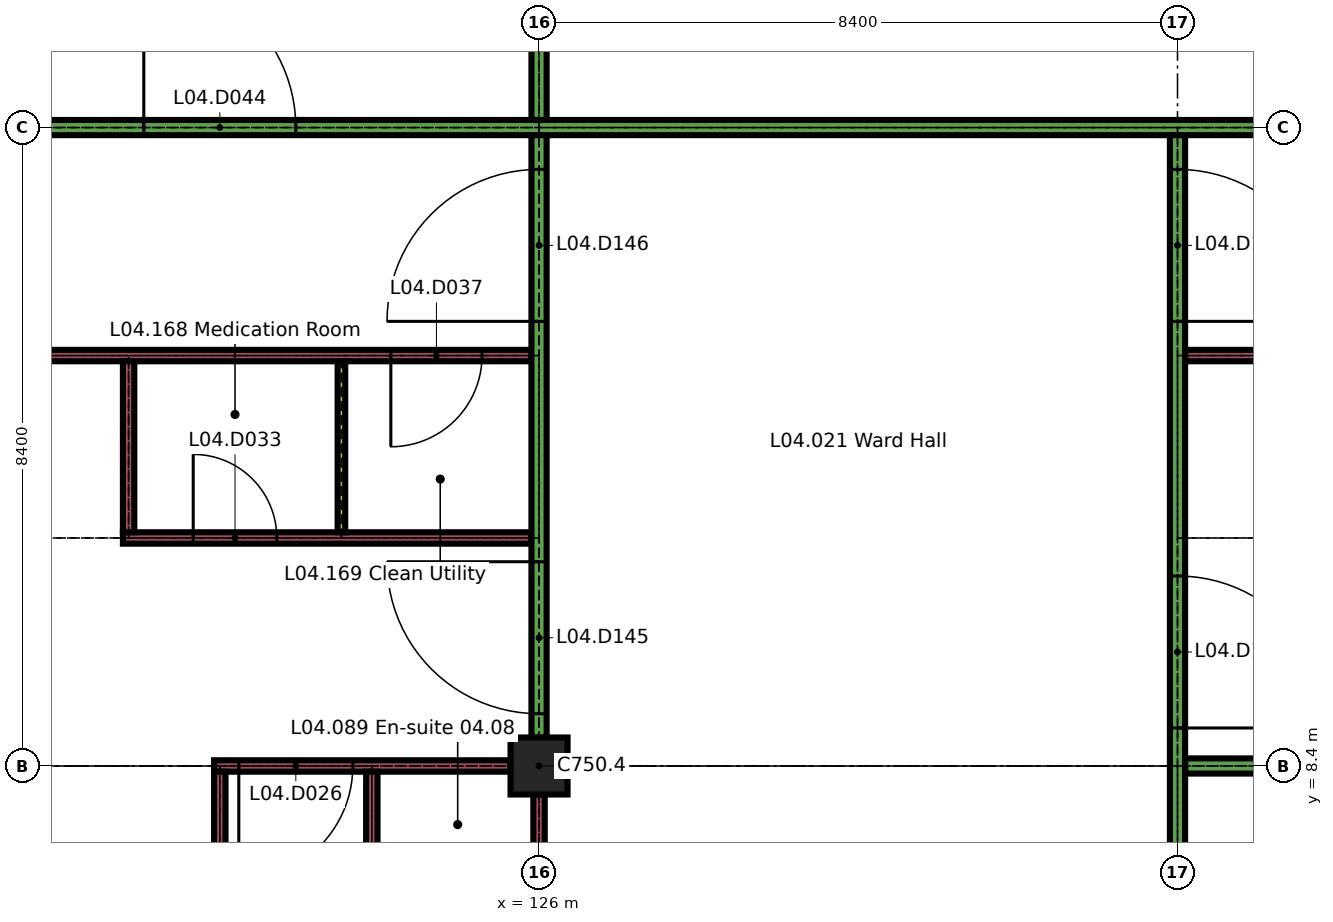
"""IFC4 building model, lengths in metres.
Left out: names, types, materials, properties, quantities, classifications, styles, units other than length and angle.
Written with IfcOpenShell. Run it as: python <this file> out.ifc"""

import sys

from ifc_helpers import new_model, si_unit, direction, frame, frame_2d, origin, origin_2d, place, context, subcontext, project, spatial, rectangle, extrude, element, fill, save


model = new_model("IFC4")
c1 = context("Model", 3, precision=1e-05, world=origin(), true_north=direction((0.0, 1.0)))
c2 = subcontext(c1, "Body", "Model", "MODEL_VIEW")
j1 = project(units=[si_unit("LENGTHUNIT", "METRE"), si_unit("PLANEANGLEUNIT", "RADIAN")], contexts=[c1])
p1 = place(None, origin())
s1 = spatial("IfcSite", under=j1, at=p1, CompositionType="ELEMENT")
p2 = place(p1, origin())
s2 = spatial("IfcBuilding", under=s1, at=p2, CompositionType="ELEMENT")
p3 = place(p2, frame((0.0, 0.0, 18.9)))
s3 = spatial("IfcBuildingStorey", under=s2, at=p3, CompositionType="ELEMENT", Elevation=18.9)
p4 = place(p3, frame((126.0, 8.4, 0.0), z_axis=(0.0, 0.0, 1.0), x_axis=(1.0, 0.0, 0.0)))
e1 = element("IfcColumn", 1, at=p4, inside=s3, PredefinedType="COLUMN", context=c2, shape_type="SweptSolid", body=[
    extrude(rectangle(XDim=0.75, YDim=0.75, at=origin_2d()), origin(), (0.0, 0.0, 1.0), 3.26),
])
p5 = place(p3, frame((121.725, 8.4, 0.0), z_axis=(0.0, 0.0, 1.0), x_axis=(1.0, 0.0, 0.0)))
e2 = element("IfcWall", 2, at=p5, inside=s3, PredefinedType="PARTITIONING", context=c2, shape_type="SweptSolid", body=[
    extrude(rectangle(XDim=3.9, YDim=0.15, at=frame_2d((1.95, 0.0))), origin(), (0.0, 0.0, 1.0), 3.26),
])
p6 = place(p5, frame((0.325, 0.0, 0.0)))
e3 = element("IfcOpeningElement", 3, at=p6, cuts=e2, PredefinedType="OPENING", context=c2, shape_type="SweptSolid", body=[
    extrude(rectangle(XDim=1.5, YDim=2.4, at=frame_2d((0.75, 1.2))), frame((0.0, 0.085, 0.0), z_axis=(0.0, -1.0, 0.0), x_axis=(1.0, 0.0, 0.0)), (0.0, 0.0, 1.0), 0.17),
])
p7 = place(p3, frame((134.5, 8.4, 0.0), z_axis=(0.0, 0.0, 1.0), x_axis=(1.0, 0.0, 0.0)))
e4 = element("IfcWall", 4, at=p7, inside=s3, PredefinedType="PARTITIONING", context=c2, shape_type="SweptSolid", body=[
    extrude(rectangle(XDim=8.2, YDim=0.2, at=frame_2d((4.1, 0.0))), origin(), (0.0, 0.0, 1.0), 3.26),
])
p8 = place(p7, frame((3.1, 0.0, 0.0)))
e5 = element("IfcOpeningElement", 5, at=p8, cuts=e4, PredefinedType="OPENING", context=c2, shape_type="SweptSolid", body=[
    extrude(rectangle(XDim=2.0, YDim=2.4, at=frame_2d((1.0, 1.2))), frame((0.0, 0.11, 0.0), z_axis=(0.0, -1.0, 0.0), x_axis=(1.0, 0.0, 0.0)), (0.0, 0.0, 1.0), 0.22),
])
p9 = place(p3, frame((120.525, 11.4, 0.0), z_axis=(0.0, 0.0, 1.0), x_axis=(1.0, 0.0, 0.0)))
e6 = element("IfcWall", 6, at=p9, inside=s3, PredefinedType="PARTITIONING", context=c2, shape_type="SweptSolid", body=[
    extrude(rectangle(XDim=5.375, YDim=0.15, at=frame_2d((2.688, 0.0))), origin(), (0.0, 0.0, 1.0), 3.26),
])
p10 = place(p9, frame((0.925, 0.0, 0.0)))
e7 = element("IfcOpeningElement", 7, at=p10, cuts=e6, PredefinedType="OPENING", context=c2, shape_type="SweptSolid", body=[
    extrude(rectangle(XDim=1.1, YDim=2.1, at=frame_2d((0.55, 1.05))), frame((0.0, 0.085, 0.0), z_axis=(0.0, -1.0, 0.0), x_axis=(1.0, 0.0, 0.0)), (0.0, 0.0, 1.0), 0.17),
])
p11 = place(p3, frame((112.125, 13.8, 0.0), z_axis=(0.0, 0.0, 1.0), x_axis=(1.0, 0.0, 0.0)))
e8 = element("IfcWall", 8, at=p11, inside=s3, PredefinedType="PARTITIONING", context=c2, shape_type="SweptSolid", body=[
    extrude(rectangle(XDim=13.775, YDim=0.15, at=frame_2d((6.887, 0.0))), origin(), (0.0, 0.0, 1.0), 3.26),
])
p12 = place(p11, frame((11.925, 0.0, 0.0)))
e9 = element("IfcOpeningElement", 9, at=p12, cuts=e8, PredefinedType="OPENING", context=c2, shape_type="SweptSolid", body=[
    extrude(rectangle(XDim=1.2, YDim=2.1, at=frame_2d((0.6, 1.05))), frame((0.0, 0.085, 0.0), z_axis=(0.0, -1.0, 0.0), x_axis=(1.0, 0.0, 0.0)), (0.0, 0.0, 1.0), 0.17),
])
p13 = place(p3, frame((134.5, 13.8, 0.0), z_axis=(0.0, 0.0, 1.0), x_axis=(1.0, 0.0, 0.0)))
e10 = element("IfcWall", 10, at=p13, inside=s3, PredefinedType="PARTITIONING", context=c2, shape_type="SweptSolid", body=[
    extrude(rectangle(XDim=8.2, YDim=0.15, at=frame_2d((4.1, 0.0))), origin(), (0.0, 0.0, 1.0), 3.26),
])
p14 = place(p3, frame((117.5, 16.8, 0.0), z_axis=(0.0, 0.0, 1.0), x_axis=(1.0, 0.0, 0.0)))
e11 = element("IfcWall", 11, at=p14, inside=s3, PredefinedType="PARTITIONING", context=c2, shape_type="SweptSolid", body=[
    extrude(rectangle(XDim=25.2, YDim=0.2, at=frame_2d((12.6, 0.0))), origin(), (0.0, 0.0, 1.0), 3.26),
])
p15 = place(p14, frame((3.3, 0.0, 0.0)))
e12 = element("IfcOpeningElement", 12, at=p15, cuts=e11, PredefinedType="OPENING", context=c2, shape_type="SweptSolid", body=[
    extrude(rectangle(XDim=2.0, YDim=2.4, at=frame_2d((1.0, 1.2))), frame((0.0, 0.11, 0.0), z_axis=(0.0, -1.0, 0.0), x_axis=(1.0, 0.0, 0.0)), (0.0, 0.0, 1.0), 0.22),
])
p16 = place(p14, frame((20.05, 0.0, 0.0)))
e13 = element("IfcOpeningElement", 13, at=p16, cuts=e11, PredefinedType="OPENING", context=c2, shape_type="SweptSolid", body=[
    extrude(rectangle(XDim=2.0, YDim=2.4, at=frame_2d((1.0, 1.2))), frame((0.0, 0.11, 0.0), z_axis=(0.0, -1.0, 0.0), x_axis=(1.0, 0.0, 0.0)), (0.0, 0.0, 1.0), 0.22),
])
p17 = place(p3, frame((120.6, 11.475, 0.0), z_axis=(0.0, 0.0, 1.0), x_axis=(0.0, 1.0, 0.0)))
e14 = element("IfcWall", 14, at=p17, inside=s3, PredefinedType="PARTITIONING", context=c2, shape_type="SweptSolid", body=[
    extrude(rectangle(XDim=2.25, YDim=0.15, at=frame_2d((1.125, 0.0))), origin(), (0.0, 0.0, 1.0), 3.26),
])
p18 = place(p3, frame((121.8, 0.15, 0.0), z_axis=(0.0, 0.0, 1.0), x_axis=(0.0, 1.0, 0.0)))
e15 = element("IfcWall", 15, at=p18, inside=s3, PredefinedType="PARTITIONING", context=c2, shape_type="SweptSolid", body=[
    extrude(rectangle(XDim=8.175, YDim=0.15, at=frame_2d((4.087, 0.0))), origin(), (0.0, 0.0, 1.0), 3.26),
])
p19 = place(p3, frame((123.4, 11.475, 0.0), z_axis=(0.0, 0.0, 1.0), x_axis=(0.0, 1.0, 0.0)))
e16 = element("IfcWall", 16, at=p19, inside=s3, PredefinedType="PARTITIONING", context=c2, shape_type="SweptSolid", body=[
    extrude(rectangle(XDim=2.25, YDim=0.1, at=frame_2d((1.125, 0.0))), origin(), (0.0, 0.0, 1.0), 3.26),
])
p20 = place(p3, frame((123.8, 6.075, 0.0), z_axis=(0.0, 0.0, 1.0), x_axis=(0.0, 1.0, 0.0)))
e17 = element("IfcWall", 17, at=p20, inside=s3, PredefinedType="PARTITIONING", context=c2, shape_type="SweptSolid", body=[
    extrude(rectangle(XDim=2.25, YDim=0.15, at=frame_2d((1.125, 0.0))), origin(), (0.0, 0.0, 1.0), 3.26),
])
p21 = place(p3, frame((126.0, 0.375, 0.0), z_axis=(0.0, 0.0, 1.0), x_axis=(0.0, 1.0, 0.0)))
e18 = element("IfcWall", 18, at=p21, inside=s3, PredefinedType="PARTITIONING", context=c2, shape_type="SweptSolid", body=[
    extrude(rectangle(XDim=7.65, YDim=0.15, at=frame_2d((3.825, 0.0))), origin(), (0.0, 0.0, 1.0), 3.26),
])
p22 = place(p3, frame((126.0, 8.775, 0.0), z_axis=(0.0, 0.0, 1.0), x_axis=(0.0, 1.0, 0.0)))
e19 = element("IfcWall", 19, at=p22, inside=s3, PredefinedType="PARTITIONING", context=c2, shape_type="SweptSolid", body=[
    extrude(rectangle(XDim=7.925, YDim=0.2, at=frame_2d((3.962, 0.0))), origin(), (0.0, 0.0, 1.0), 3.26),
])
p23 = place(p22, frame((0.312, 0.0, 0.0)))
e20 = element("IfcOpeningElement", 20, at=p23, cuts=e19, PredefinedType="OPENING", context=c2, shape_type="SweptSolid", body=[
    extrude(rectangle(XDim=2.0, YDim=2.4, at=frame_2d((1.0, 1.2))), frame((0.0, 0.11, 0.0), z_axis=(0.0, -1.0, 0.0), x_axis=(1.0, 0.0, 0.0)), (0.0, 0.0, 1.0), 0.22),
])
p24 = place(p22, frame((5.475, 0.0, 0.0)))
e21 = element("IfcOpeningElement", 21, at=p24, cuts=e19, PredefinedType="OPENING", context=c2, shape_type="SweptSolid", body=[
    extrude(rectangle(XDim=2.0, YDim=2.4, at=frame_2d((1.0, 1.2))), frame((0.0, 0.11, 0.0), z_axis=(0.0, -1.0, 0.0), x_axis=(1.0, 0.0, 0.0)), (0.0, 0.0, 1.0), 0.22),
])
p25 = place(p3, frame((126.0, 16.9, 0.0), z_axis=(0.0, 0.0, 1.0), x_axis=(0.0, 1.0, 0.0)))
e22 = element("IfcWall", 22, at=p25, inside=s3, PredefinedType="PARTITIONING", context=c2, shape_type="SweptSolid", body=[
    extrude(rectangle(XDim=4.5, YDim=0.2, at=frame_2d((2.25, 0.0))), origin(), (0.0, 0.0, 1.0), 3.26),
])
p26 = place(p3, frame((134.4, 3.6, 0.0), z_axis=(0.0, 0.0, 1.0), x_axis=(0.0, 1.0, 0.0)))
e23 = element("IfcWall", 23, at=p26, inside=s3, PredefinedType="PARTITIONING", context=c2, shape_type="SweptSolid", body=[
    extrude(rectangle(XDim=13.1, YDim=0.2, at=frame_2d((6.55, 0.0))), origin(), (0.0, 0.0, 1.0), 3.26),
])
p27 = place(p26, frame((5.3, 0.0, 0.0)))
e24 = element("IfcOpeningElement", 24, at=p27, cuts=e23, PredefinedType="OPENING", context=c2, shape_type="SweptSolid", body=[
    extrude(rectangle(XDim=2.0, YDim=2.4, at=frame_2d((1.0, 1.2))), frame((0.0, 0.11, 0.0), z_axis=(0.0, -1.0, 0.0), x_axis=(1.0, 0.0, 0.0)), (0.0, 0.0, 1.0), 0.22),
])
p28 = place(p26, frame((10.65, 0.0, 0.0)))
e25 = element("IfcOpeningElement", 25, at=p28, cuts=e23, PredefinedType="OPENING", context=c2, shape_type="SweptSolid", body=[
    extrude(rectangle(XDim=2.0, YDim=2.4, at=frame_2d((1.0, 1.2))), frame((0.0, 0.11, 0.0), z_axis=(0.0, -1.0, 0.0), x_axis=(1.0, 0.0, 0.0)), (0.0, 0.0, 1.0), 0.22),
])
p29 = place(p6, origin())
e26 = element("IfcDoor", 26, at=p29, inside=s3, OperationType="SINGLE_SWING_LEFT", PredefinedType="DOOR", context=c2, shape_type="SweptSolid", body=[
    extrude(rectangle(XDim=1.5, YDim=2.4, at=frame_2d((0.75, 1.2))), frame((0.0, 0.03, 0.0), z_axis=(0.0, -1.0, 0.0), x_axis=(1.0, 0.0, 0.0)), (0.0, 0.0, 1.0), 0.06),
])
fill(e3, e26)
p30 = place(p10, origin())
e27 = element("IfcDoor", 27, at=p30, inside=s3, OperationType="SINGLE_SWING_RIGHT", PredefinedType="DOOR", context=c2, shape_type="SweptSolid", body=[
    extrude(rectangle(XDim=1.1, YDim=2.1, at=frame_2d((0.55, 1.05))), frame((0.0, 0.025, 0.0), z_axis=(0.0, -1.0, 0.0), x_axis=(1.0, 0.0, 0.0)), (0.0, 0.0, 1.0), 0.05),
])
fill(e7, e27)
p31 = place(p12, origin())
e28 = element("IfcDoor", 28, at=p31, inside=s3, OperationType="SINGLE_SWING_LEFT", PredefinedType="DOOR", context=c2, shape_type="SweptSolid", body=[
    extrude(rectangle(XDim=1.2, YDim=2.1, at=frame_2d((0.6, 1.05))), frame((0.0, 0.025, 0.0), z_axis=(0.0, -1.0, 0.0), x_axis=(1.0, 0.0, 0.0)), (0.0, 0.0, 1.0), 0.05),
])
fill(e9, e28)
p32 = place(p15, origin())
e29 = element("IfcDoor", 29, at=p32, inside=s3, OperationType="SINGLE_SWING_RIGHT", PredefinedType="DOOR", context=c2, shape_type="SweptSolid", body=[
    extrude(rectangle(XDim=2.0, YDim=2.4, at=frame_2d((1.0, 1.2))), frame((0.0, 0.03, 0.0), z_axis=(0.0, -1.0, 0.0), x_axis=(1.0, 0.0, 0.0)), (0.0, 0.0, 1.0), 0.06),
])
fill(e12, e29)
p33 = place(p23, origin())
e30 = element("IfcDoor", 30, at=p33, inside=s3, OperationType="SINGLE_SWING_LEFT", PredefinedType="DOOR", context=c2, shape_type="SweptSolid", body=[
    extrude(rectangle(XDim=2.0, YDim=2.4, at=frame_2d((1.0, 1.2))), frame((0.0, 0.03, 0.0), z_axis=(0.0, -1.0, 0.0), x_axis=(1.0, 0.0, 0.0)), (0.0, 0.0, 1.0), 0.06),
])
fill(e20, e30)
p34 = place(p24, origin())
e31 = element("IfcDoor", 31, at=p34, inside=s3, OperationType="SINGLE_SWING_RIGHT", PredefinedType="DOOR", context=c2, shape_type="SweptSolid", body=[
    extrude(rectangle(XDim=2.0, YDim=2.4, at=frame_2d((1.0, 1.2))), frame((0.0, 0.03, 0.0), z_axis=(0.0, -1.0, 0.0), x_axis=(1.0, 0.0, 0.0)), (0.0, 0.0, 1.0), 0.06),
])
fill(e21, e31)
p35 = place(p27, origin())
e32 = element("IfcDoor", 32, at=p35, inside=s3, OperationType="SINGLE_SWING_LEFT", PredefinedType="DOOR", context=c2, shape_type="SweptSolid", body=[
    extrude(rectangle(XDim=2.0, YDim=2.4, at=frame_2d((1.0, 1.2))), frame((0.0, 0.03, 0.0), z_axis=(0.0, -1.0, 0.0), x_axis=(1.0, 0.0, 0.0)), (0.0, 0.0, 1.0), 0.06),
])
fill(e24, e32)
p36 = place(p28, origin())
e33 = element("IfcDoor", 33, at=p36, inside=s3, OperationType="SINGLE_SWING_LEFT", PredefinedType="DOOR", context=c2, shape_type="SweptSolid", body=[
    extrude(rectangle(XDim=2.0, YDim=2.4, at=frame_2d((1.0, 1.2))), frame((0.0, 0.03, 0.0), z_axis=(0.0, -1.0, 0.0), x_axis=(1.0, 0.0, 0.0)), (0.0, 0.0, 1.0), 0.06),
])
fill(e25, e33)
save(model, sys.argv[1])
